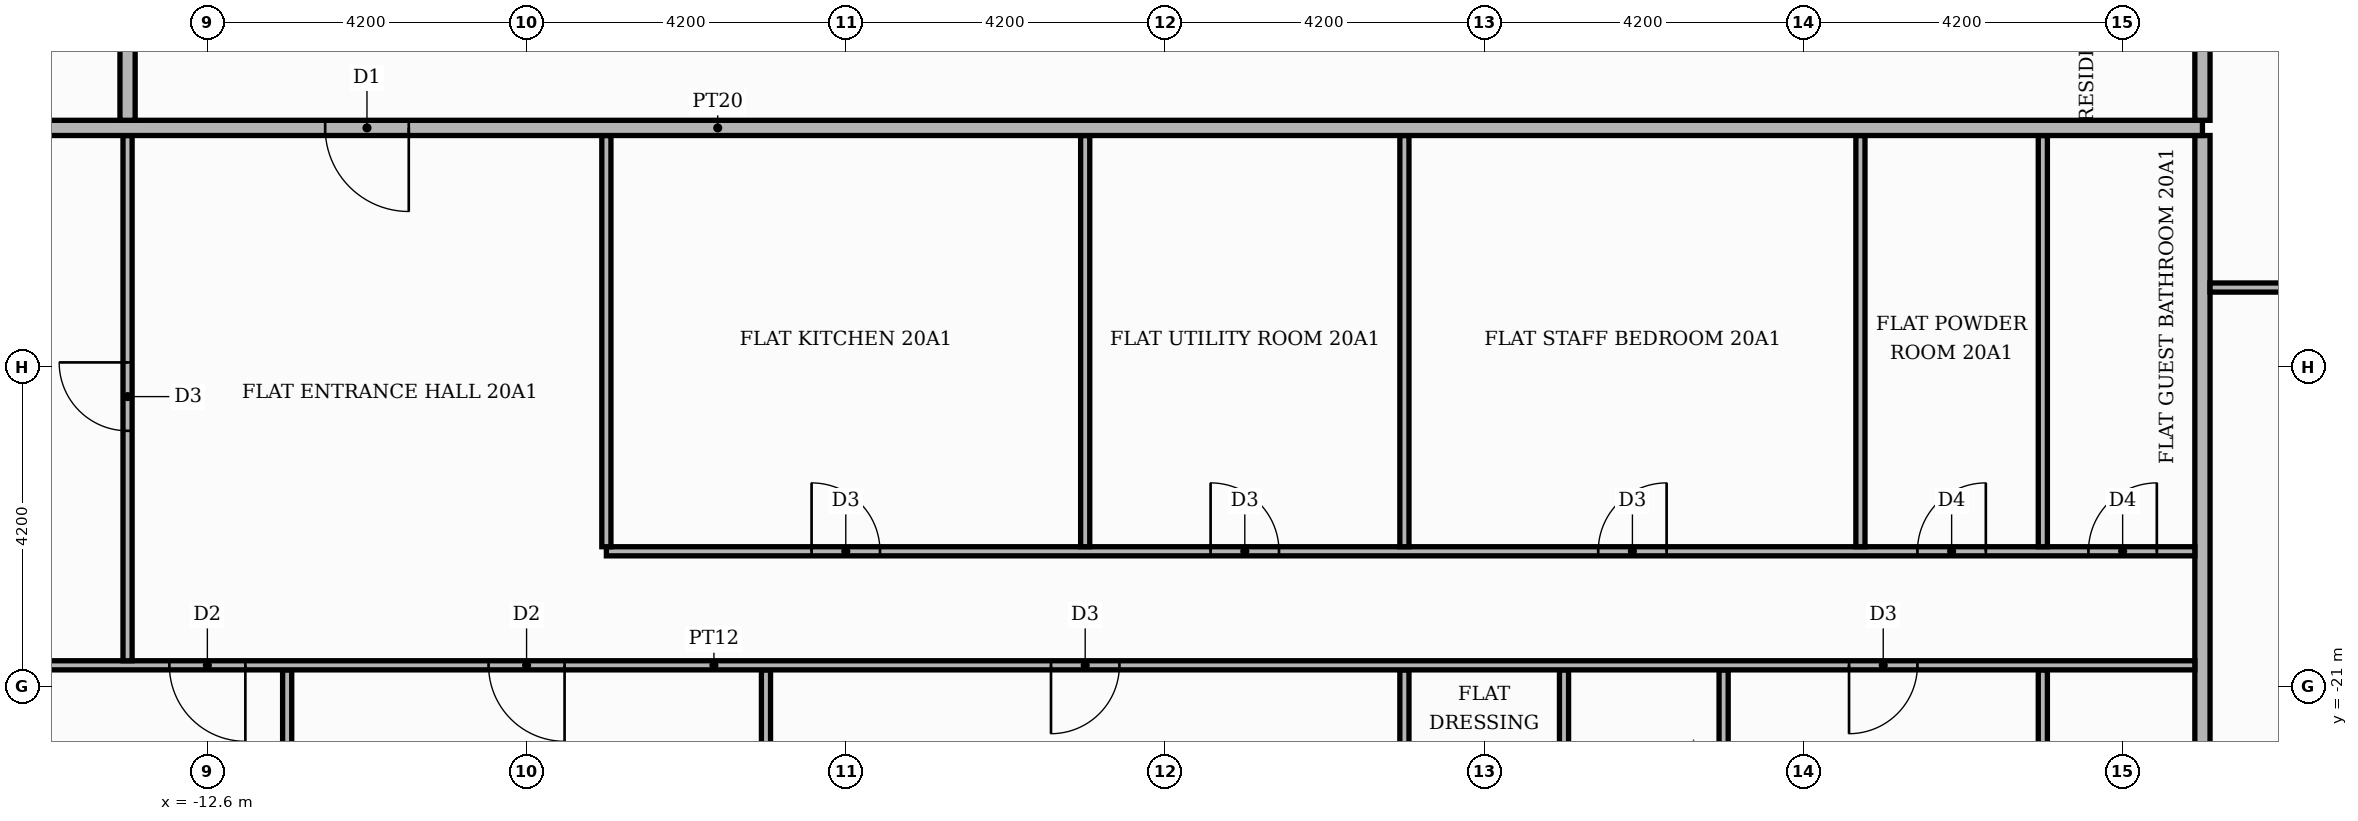
"""IFC4 building model, lengths in metres.
Left out: names, types, materials, properties, quantities, classifications, styles, units other than length and angle.
Written with IfcOpenShell. Run it as: python <this file> out.ifc"""

import sys

from ifc_helpers import new_model, si_unit, direction, frame, frame_2d, origin, place, context, subcontext, project, spatial, rectangle, extrude, element, fill, save


model = new_model("IFC4")
c1 = context("Model", 3, precision=1e-05, world=origin(), true_north=direction((0.0, 1.0)))
c2 = subcontext(c1, "Body", "Model", "MODEL_VIEW")
j1 = project(units=[si_unit("LENGTHUNIT", "METRE"), si_unit("PLANEANGLEUNIT", "RADIAN")], contexts=[c1])
p1 = place(None, origin())
s1 = spatial("IfcSite", under=j1, at=p1, CompositionType="ELEMENT")
p2 = place(p1, origin())
s2 = spatial("IfcBuilding", under=s1, at=p2, CompositionType="ELEMENT")
p3 = place(p2, frame((0.0, 0.0, 87.0)))
s3 = spatial("IfcBuildingStorey", under=s2, at=p3, CompositionType="ELEMENT", Elevation=87.0)
for number, where, z_axis, x_axis in (
    (1, (-11.55, -25.42, 0.0), (0.0, 0.0, 1.0), (0.0, 1.0, 0.0)),
    (2, (-5.25, -25.42, 0.0), (0.0, 0.0, 1.0), (0.0, 1.0, 0.0)),
):
    element("IfcWall", number, at=place(p3, frame(where, z_axis=z_axis, x_axis=x_axis)), inside=s3, PredefinedType="PARTITIONING", context=c2, shape_type="SweptSolid", body=[
        extrude(rectangle(XDim=4.64, YDim=0.12, at=frame_2d((2.32, 0.0))), origin(), (0.0, 0.0, 1.0), 3.48),
    ])
p4 = place(p3, frame((3.15, -25.42, 0.0), z_axis=(0.0, 0.0, 1.0), x_axis=(0.0, 1.0, 0.0)))
e3 = element("IfcWall", 3, at=p4, inside=s3, PredefinedType="PARTITIONING", context=c2, shape_type="SweptSolid", body=[
    extrude(rectangle(XDim=4.64, YDim=0.12, at=frame_2d((2.32, 0.0))), origin(), (0.0, 0.0, 1.0), 3.48),
])
p5 = place(p4, frame((1.75, 0.0, 0.0)))
e4 = element("IfcOpeningElement", 4, at=p5, cuts=e3, PredefinedType="OPENING", context=c2, shape_type="SweptSolid", body=[
    extrude(rectangle(XDim=0.9, YDim=2.1, at=frame_2d((0.45, 1.05))), frame((0.0, 0.07, 0.0), z_axis=(0.0, -1.0, 0.0), x_axis=(1.0, 0.0, 0.0)), (0.0, 0.0, 1.0), 0.14),
])
p6 = place(p3, frame((5.25, -25.42, 0.0), z_axis=(0.0, 0.0, 1.0), x_axis=(0.0, 1.0, 0.0)))
e5 = element("IfcWall", 5, at=p6, inside=s3, PredefinedType="PARTITIONING", context=c2, shape_type="SweptSolid", body=[
    extrude(rectangle(XDim=4.64, YDim=0.12, at=frame_2d((2.32, 0.0))), origin(), (0.0, 0.0, 1.0), 3.48),
])
p7 = place(p6, frame((1.75, 0.0, 0.0)))
e6 = element("IfcOpeningElement", 6, at=p7, cuts=e5, PredefinedType="OPENING", context=c2, shape_type="SweptSolid", body=[
    extrude(rectangle(XDim=0.9, YDim=2.1, at=frame_2d((0.45, 1.05))), frame((0.0, 0.07, 0.0), z_axis=(0.0, -1.0, 0.0), x_axis=(1.0, 0.0, 0.0)), (0.0, 0.0, 1.0), 0.14),
])
p8 = place(p3, frame((7.35, -25.42, 0.0), z_axis=(0.0, 0.0, 1.0), x_axis=(0.0, 1.0, 0.0)))
e7 = element("IfcWall", 7, at=p8, inside=s3, PredefinedType="PARTITIONING", context=c2, shape_type="SweptSolid", body=[
    extrude(rectangle(XDim=4.64, YDim=0.12, at=frame_2d((2.32, 0.0))), origin(), (0.0, 0.0, 1.0), 3.48),
])
p9 = place(p3, frame((11.55, -25.42, 0.0), z_axis=(0.0, 0.0, 1.0), x_axis=(0.0, 1.0, 0.0)))
e8 = element("IfcWall", 8, at=p9, inside=s3, PredefinedType="PARTITIONING", context=c2, shape_type="SweptSolid", body=[
    extrude(rectangle(XDim=4.64, YDim=0.12, at=frame_2d((2.32, 0.0))), origin(), (0.0, 0.0, 1.0), 3.48),
])
p10 = place(p9, frame((1.75, 0.0, 0.0)))
e9 = element("IfcOpeningElement", 9, at=p10, cuts=e8, PredefinedType="OPENING", context=c2, shape_type="SweptSolid", body=[
    extrude(rectangle(XDim=0.9, YDim=2.1, at=frame_2d((0.45, 1.05))), frame((0.0, 0.07, 0.0), z_axis=(0.0, -1.0, 0.0), x_axis=(1.0, 0.0, 0.0)), (0.0, 0.0, 1.0), 0.14),
])
p11 = place(p3, frame((13.65, -25.42, 0.0), z_axis=(0.0, 0.0, 1.0), x_axis=(0.0, 1.0, 0.0)))
e10 = element("IfcWall", 10, at=p11, inside=s3, PredefinedType="PARTITIONING", context=c2, shape_type="SweptSolid", body=[
    extrude(rectangle(XDim=11.67, YDim=0.2, at=frame_2d((5.835, 0.0))), origin(), (0.0, 0.0, 1.0), 3.48),
])
p12 = place(p3, frame((-25.42, -20.72, 0.0), z_axis=(0.0, 0.0, 1.0), x_axis=(1.0, 0.0, 0.0)))
e11 = element("IfcWall", 11, at=p12, inside=s3, PredefinedType="PARTITIONING", context=c2, shape_type="SweptSolid", body=[
    extrude(rectangle(XDim=38.97, YDim=0.12, at=frame_2d((19.485, 0.0))), origin(), (0.0, 0.0, 1.0), 3.48),
])
p13 = place(p12, frame((12.32, 0.0, 0.0)))
e12 = element("IfcOpeningElement", 12, at=p13, cuts=e11, PredefinedType="OPENING", context=c2, shape_type="SweptSolid", body=[
    extrude(rectangle(XDim=1.0, YDim=2.1, at=frame_2d((0.5, 1.05))), frame((0.0, 0.07, 0.0), z_axis=(0.0, -1.0, 0.0), x_axis=(1.0, 0.0, 0.0)), (0.0, 0.0, 1.0), 0.14),
])
p14 = place(p12, frame((16.52, 0.0, 0.0)))
e13 = element("IfcOpeningElement", 13, at=p14, cuts=e11, PredefinedType="OPENING", context=c2, shape_type="SweptSolid", body=[
    extrude(rectangle(XDim=1.0, YDim=2.1, at=frame_2d((0.5, 1.05))), frame((0.0, 0.07, 0.0), z_axis=(0.0, -1.0, 0.0), x_axis=(1.0, 0.0, 0.0)), (0.0, 0.0, 1.0), 0.14),
])
p15 = place(p12, frame((23.92, 0.0, 0.0)))
e14 = element("IfcOpeningElement", 14, at=p15, cuts=e11, PredefinedType="OPENING", context=c2, shape_type="SweptSolid", body=[
    extrude(rectangle(XDim=0.9, YDim=2.1, at=frame_2d((0.45, 1.05))), frame((0.0, 0.07, 0.0), z_axis=(0.0, -1.0, 0.0), x_axis=(1.0, 0.0, 0.0)), (0.0, 0.0, 1.0), 0.14),
])
p16 = place(p12, frame((34.42, 0.0, 0.0)))
e15 = element("IfcOpeningElement", 15, at=p16, cuts=e11, PredefinedType="OPENING", context=c2, shape_type="SweptSolid", body=[
    extrude(rectangle(XDim=0.9, YDim=2.1, at=frame_2d((0.45, 1.05))), frame((0.0, 0.07, 0.0), z_axis=(0.0, -1.0, 0.0), x_axis=(1.0, 0.0, 0.0)), (0.0, 0.0, 1.0), 0.14),
])
p17 = place(p3, frame((-13.65, -20.66, 0.0), z_axis=(0.0, 0.0, 1.0), x_axis=(0.0, 1.0, 0.0)))
e16 = element("IfcWall", 16, at=p17, inside=s3, PredefinedType="PARTITIONING", context=c2, shape_type="SweptSolid", body=[
    extrude(rectangle(XDim=6.91, YDim=0.12, at=frame_2d((3.455, 0.0))), origin(), (0.0, 0.0, 1.0), 3.48),
])
p18 = place(p17, frame((3.025, 0.0, 0.0)))
e17 = element("IfcOpeningElement", 17, at=p18, cuts=e16, PredefinedType="OPENING", context=c2, shape_type="SweptSolid", body=[
    extrude(rectangle(XDim=0.9, YDim=2.1, at=frame_2d((0.45, 1.05))), frame((0.0, 0.07, 0.0), z_axis=(0.0, -1.0, 0.0), x_axis=(1.0, 0.0, 0.0)), (0.0, 0.0, 1.0), 0.14),
])
p19 = place(p3, frame((-7.35, -19.22, 0.0), z_axis=(0.0, 0.0, 1.0), x_axis=(1.0, 0.0, 0.0)))
e18 = element("IfcWall", 18, at=p19, inside=s3, PredefinedType="PARTITIONING", context=c2, shape_type="SweptSolid", body=[
    extrude(rectangle(XDim=20.9, YDim=0.12, at=frame_2d((10.45, 0.0))), origin(), (0.0, 0.0, 1.0), 3.48),
])
p20 = place(p19, frame((2.7, 0.0, 0.0)))
e19 = element("IfcOpeningElement", 19, at=p20, cuts=e18, PredefinedType="OPENING", context=c2, shape_type="SweptSolid", body=[
    extrude(rectangle(XDim=0.9, YDim=2.1, at=frame_2d((0.45, 1.05))), frame((0.0, 0.07, 0.0), z_axis=(0.0, -1.0, 0.0), x_axis=(1.0, 0.0, 0.0)), (0.0, 0.0, 1.0), 0.14),
])
p21 = place(p19, frame((7.95, 0.0, 0.0)))
e20 = element("IfcOpeningElement", 20, at=p21, cuts=e18, PredefinedType="OPENING", context=c2, shape_type="SweptSolid", body=[
    extrude(rectangle(XDim=0.9, YDim=2.1, at=frame_2d((0.45, 1.05))), frame((0.0, 0.07, 0.0), z_axis=(0.0, -1.0, 0.0), x_axis=(1.0, 0.0, 0.0)), (0.0, 0.0, 1.0), 0.14),
])
p22 = place(p19, frame((13.05, 0.0, 0.0)))
e21 = element("IfcOpeningElement", 21, at=p22, cuts=e18, PredefinedType="OPENING", context=c2, shape_type="SweptSolid", body=[
    extrude(rectangle(XDim=0.9, YDim=2.1, at=frame_2d((0.45, 1.05))), frame((0.0, 0.07, 0.0), z_axis=(0.0, -1.0, 0.0), x_axis=(1.0, 0.0, 0.0)), (0.0, 0.0, 1.0), 0.14),
])
p23 = place(p19, frame((17.25, 0.0, 0.0)))
e22 = element("IfcOpeningElement", 22, at=p23, cuts=e18, PredefinedType="OPENING", context=c2, shape_type="SweptSolid", body=[
    extrude(rectangle(XDim=0.9, YDim=2.1, at=frame_2d((0.45, 1.05))), frame((0.0, 0.07, 0.0), z_axis=(0.0, -1.0, 0.0), x_axis=(1.0, 0.0, 0.0)), (0.0, 0.0, 1.0), 0.14),
])
p24 = place(p19, frame((19.5, 0.0, 0.0)))
e23 = element("IfcOpeningElement", 23, at=p24, cuts=e18, PredefinedType="OPENING", context=c2, shape_type="SweptSolid", body=[
    extrude(rectangle(XDim=0.9, YDim=2.1, at=frame_2d((0.45, 1.05))), frame((0.0, 0.07, 0.0), z_axis=(0.0, -1.0, 0.0), x_axis=(1.0, 0.0, 0.0)), (0.0, 0.0, 1.0), 0.14),
])
for number, where, z_axis, x_axis in (
    (24, (-7.35, -19.16, 0.0), (0.0, 0.0, 1.0), (0.0, 1.0, 0.0)),
    (25, (-1.05, -19.16, 0.0), (0.0, 0.0, 1.0), (0.0, 1.0, 0.0)),
    (26, (3.15, -19.16, 0.0), (0.0, 0.0, 1.0), (0.0, 1.0, 0.0)),
    (27, (9.15, -19.16, 0.0), (0.0, 0.0, 1.0), (0.0, 1.0, 0.0)),
    (28, (11.55, -19.16, 0.0), (0.0, 0.0, 1.0), (0.0, 1.0, 0.0)),
):
    element("IfcWall", number, at=place(p3, frame(where, z_axis=z_axis, x_axis=x_axis)), inside=s3, PredefinedType="PARTITIONING", context=c2, shape_type="SweptSolid", body=[
        extrude(rectangle(XDim=5.41, YDim=0.12, at=frame_2d((2.705, 0.0))), origin(), (0.0, 0.0, 1.0), 3.48),
    ])
p25 = place(p3, frame((13.75, -15.75, 0.0), z_axis=(0.0, 0.0, 1.0), x_axis=(1.0, 0.0, 0.0)))
e29 = element("IfcWall", 29, at=p25, inside=s3, PredefinedType="PARTITIONING", context=c2, shape_type="SweptSolid", body=[
    extrude(rectangle(XDim=6.67, YDim=0.12, at=frame_2d((3.335, 0.0))), origin(), (0.0, 0.0, 1.0), 3.48),
])
p26 = place(p25, frame((2.785, 0.0, 0.0)))
e30 = element("IfcOpeningElement", 30, at=p26, cuts=e29, PredefinedType="OPENING", context=c2, shape_type="SweptSolid", body=[
    extrude(rectangle(XDim=1.0, YDim=2.1, at=frame_2d((0.5, 1.05))), frame((0.0, 0.07, 0.0), z_axis=(0.0, -1.0, 0.0), x_axis=(1.0, 0.0, 0.0)), (0.0, 0.0, 1.0), 0.14),
])
p27 = place(p3, frame((-25.42, -13.65, 0.0), z_axis=(0.0, 0.0, 1.0), x_axis=(1.0, 0.0, 0.0)))
e31 = element("IfcWall", 31, at=p27, inside=s3, PredefinedType="PARTITIONING", context=c2, shape_type="SweptSolid", body=[
    extrude(rectangle(XDim=39.07, YDim=0.2, at=frame_2d((19.535, 0.0))), origin(), (0.0, 0.0, 1.0), 3.48),
])
p28 = place(p27, frame((14.37, 0.0, 0.0)))
e32 = element("IfcOpeningElement", 32, at=p28, cuts=e31, PredefinedType="OPENING", context=c2, shape_type="SweptSolid", body=[
    extrude(rectangle(XDim=1.1, YDim=2.4, at=frame_2d((0.55, 1.2))), frame((0.0, 0.11, 0.0), z_axis=(0.0, -1.0, 0.0), x_axis=(1.0, 0.0, 0.0)), (0.0, 0.0, 1.0), 0.22),
])
p29 = place(p3, frame((-13.65, -13.55, 0.0), z_axis=(0.0, 0.0, 1.0), x_axis=(0.0, 1.0, 0.0)))
e33 = element("IfcWall", 33, at=p29, inside=s3, PredefinedType="PARTITIONING", context=c2, shape_type="SweptSolid", body=[
    extrude(rectangle(XDim=27.1, YDim=0.2, at=frame_2d((13.55, 0.0))), origin(), (0.0, 0.0, 1.0), 3.48),
])
p30 = place(p29, frame((24.55, 0.0, 0.0)))
e34 = element("IfcOpeningElement", 34, at=p30, cuts=e33, PredefinedType="OPENING", context=c2, shape_type="SweptSolid", body=[
    extrude(rectangle(XDim=1.1, YDim=2.4, at=frame_2d((0.55, 1.2))), frame((0.0, 0.11, 0.0), z_axis=(0.0, -1.0, 0.0), x_axis=(1.0, 0.0, 0.0)), (0.0, 0.0, 1.0), 0.22),
])
p31 = place(p3, frame((13.65, -13.55, 0.0), z_axis=(0.0, 0.0, 1.0), x_axis=(0.0, 1.0, 0.0)))
e35 = element("IfcWall", 35, at=p31, inside=s3, PredefinedType="PARTITIONING", context=c2, shape_type="SweptSolid", body=[
    extrude(rectangle(XDim=8.2, YDim=0.2, at=frame_2d((4.1, 0.0))), origin(), (0.0, 0.0, 1.0), 3.48),
])
p32 = place(p31, frame((1.45, 0.0, 0.0)))
e36 = element("IfcOpeningElement", 36, at=p32, cuts=e35, PredefinedType="OPENING", context=c2, shape_type="SweptSolid", body=[
    extrude(rectangle(XDim=1.1, YDim=2.4, at=frame_2d((0.55, 1.2))), frame((0.0, 0.11, 0.0), z_axis=(0.0, -1.0, 0.0), x_axis=(1.0, 0.0, 0.0)), (0.0, 0.0, 1.0), 0.22),
])
p33 = place(p28, frame((1.1, 0.0, 0.0), z_axis=(0.0, 0.0, 1.0), x_axis=(-1.0, 0.0, 0.0)))
e37 = element("IfcDoor", 37, at=p33, inside=s3, OperationType="SINGLE_SWING_RIGHT", PredefinedType="DOOR", context=c2, shape_type="SweptSolid", body=[
    extrude(rectangle(XDim=1.1, YDim=2.4, at=frame_2d((0.55, 1.2))), frame((0.0, 0.025, 0.0), z_axis=(0.0, -1.0, 0.0), x_axis=(1.0, 0.0, 0.0)), (0.0, 0.0, 1.0), 0.05),
])
fill(e32, e37)
p34 = place(p18, origin())
e38 = element("IfcDoor", 38, at=p34, inside=s3, OperationType="SINGLE_SWING_RIGHT", PredefinedType="DOOR", context=c2, shape_type="SweptSolid", body=[
    extrude(rectangle(XDim=0.9, YDim=2.1, at=frame_2d((0.45, 1.05))), frame((0.0, 0.025, 0.0), z_axis=(0.0, -1.0, 0.0), x_axis=(1.0, 0.0, 0.0)), (0.0, 0.0, 1.0), 0.05),
])
fill(e17, e38)
p35 = place(p20, origin())
e39 = element("IfcDoor", 39, at=p35, inside=s3, OperationType="SINGLE_SWING_LEFT", PredefinedType="DOOR", context=c2, shape_type="SweptSolid", body=[
    extrude(rectangle(XDim=0.9, YDim=2.1, at=frame_2d((0.45, 1.05))), frame((0.0, 0.025, 0.0), z_axis=(0.0, -1.0, 0.0), x_axis=(1.0, 0.0, 0.0)), (0.0, 0.0, 1.0), 0.05),
])
fill(e19, e39)
p36 = place(p21, origin())
e40 = element("IfcDoor", 40, at=p36, inside=s3, OperationType="SINGLE_SWING_LEFT", PredefinedType="DOOR", context=c2, shape_type="SweptSolid", body=[
    extrude(rectangle(XDim=0.9, YDim=2.1, at=frame_2d((0.45, 1.05))), frame((0.0, 0.025, 0.0), z_axis=(0.0, -1.0, 0.0), x_axis=(1.0, 0.0, 0.0)), (0.0, 0.0, 1.0), 0.05),
])
fill(e20, e40)
p37 = place(p22, origin())
e41 = element("IfcDoor", 41, at=p37, inside=s3, OperationType="SINGLE_SWING_RIGHT", PredefinedType="DOOR", context=c2, shape_type="SweptSolid", body=[
    extrude(rectangle(XDim=0.9, YDim=2.1, at=frame_2d((0.45, 1.05))), frame((0.0, 0.025, 0.0), z_axis=(0.0, -1.0, 0.0), x_axis=(1.0, 0.0, 0.0)), (0.0, 0.0, 1.0), 0.05),
])
fill(e21, e41)
p38 = place(p23, origin())
e42 = element("IfcDoor", 42, at=p38, inside=s3, OperationType="SINGLE_SWING_RIGHT", PredefinedType="DOOR", context=c2, shape_type="SweptSolid", body=[
    extrude(rectangle(XDim=0.9, YDim=2.1, at=frame_2d((0.45, 1.05))), frame((0.0, 0.025, 0.0), z_axis=(0.0, -1.0, 0.0), x_axis=(1.0, 0.0, 0.0)), (0.0, 0.0, 1.0), 0.05),
])
fill(e22, e42)
p39 = place(p24, origin())
e43 = element("IfcDoor", 43, at=p39, inside=s3, OperationType="SINGLE_SWING_RIGHT", PredefinedType="DOOR", context=c2, shape_type="SweptSolid", body=[
    extrude(rectangle(XDim=0.9, YDim=2.1, at=frame_2d((0.45, 1.05))), frame((0.0, 0.025, 0.0), z_axis=(0.0, -1.0, 0.0), x_axis=(1.0, 0.0, 0.0)), (0.0, 0.0, 1.0), 0.05),
])
fill(e23, e43)
p40 = place(p13, frame((1.0, 0.0, 0.0), z_axis=(0.0, 0.0, 1.0), x_axis=(-1.0, 0.0, 0.0)))
e44 = element("IfcDoor", 44, at=p40, inside=s3, OperationType="SINGLE_SWING_RIGHT", PredefinedType="DOOR", context=c2, shape_type="SweptSolid", body=[
    extrude(rectangle(XDim=1.0, YDim=2.1, at=frame_2d((0.5, 1.05))), frame((0.0, 0.025, 0.0), z_axis=(0.0, -1.0, 0.0), x_axis=(1.0, 0.0, 0.0)), (0.0, 0.0, 1.0), 0.05),
])
fill(e12, e44)
p41 = place(p14, frame((1.0, 0.0, 0.0), z_axis=(0.0, 0.0, 1.0), x_axis=(-1.0, 0.0, 0.0)))
e45 = element("IfcDoor", 45, at=p41, inside=s3, OperationType="SINGLE_SWING_RIGHT", PredefinedType="DOOR", context=c2, shape_type="SweptSolid", body=[
    extrude(rectangle(XDim=1.0, YDim=2.1, at=frame_2d((0.5, 1.05))), frame((0.0, 0.025, 0.0), z_axis=(0.0, -1.0, 0.0), x_axis=(1.0, 0.0, 0.0)), (0.0, 0.0, 1.0), 0.05),
])
fill(e13, e45)
p42 = place(p15, frame((0.9, 0.0, 0.0), z_axis=(0.0, 0.0, 1.0), x_axis=(-1.0, 0.0, 0.0)))
e46 = element("IfcDoor", 46, at=p42, inside=s3, OperationType="SINGLE_SWING_LEFT", PredefinedType="DOOR", context=c2, shape_type="SweptSolid", body=[
    extrude(rectangle(XDim=0.9, YDim=2.1, at=frame_2d((0.45, 1.05))), frame((0.0, 0.025, 0.0), z_axis=(0.0, -1.0, 0.0), x_axis=(1.0, 0.0, 0.0)), (0.0, 0.0, 1.0), 0.05),
])
fill(e14, e46)
p43 = place(p16, frame((0.9, 0.0, 0.0), z_axis=(0.0, 0.0, 1.0), x_axis=(-1.0, 0.0, 0.0)))
e47 = element("IfcDoor", 47, at=p43, inside=s3, OperationType="SINGLE_SWING_LEFT", PredefinedType="DOOR", context=c2, shape_type="SweptSolid", body=[
    extrude(rectangle(XDim=0.9, YDim=2.1, at=frame_2d((0.45, 1.05))), frame((0.0, 0.025, 0.0), z_axis=(0.0, -1.0, 0.0), x_axis=(1.0, 0.0, 0.0)), (0.0, 0.0, 1.0), 0.05),
])
fill(e15, e47)
save(model, sys.argv[1])
